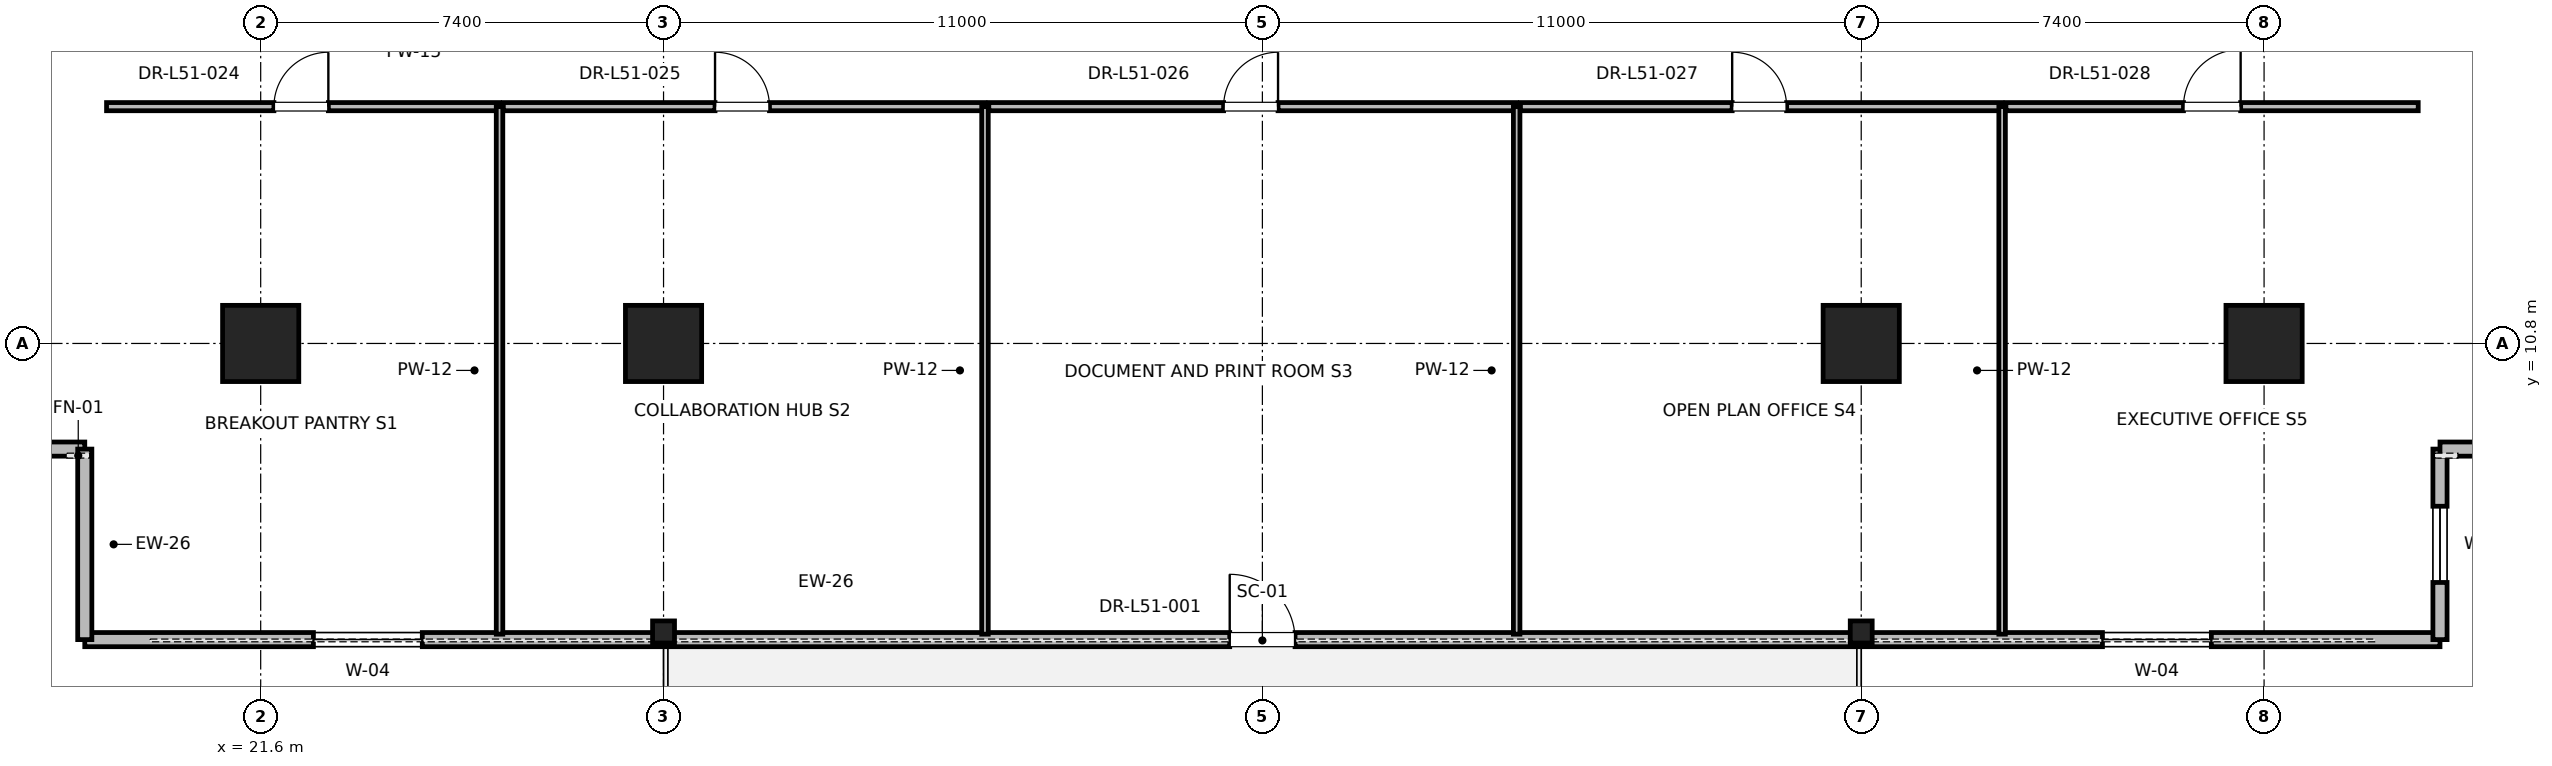
"""IFC4 building model, lengths in metres.
Left out: names, types, materials, properties, quantities, classifications, styles, units other than length and angle.
Written with IfcOpenShell. Run it as: python <this file> out.ifc"""

import sys

from ifc_helpers import new_model, si_unit, direction, frame, frame_2d, origin, origin_2d, place, context, subcontext, project, spatial, rectangle, i_section, extrude, element, fill, save


model = new_model("IFC4")
c1 = context("Model", 3, precision=1e-05, world=origin(), true_north=direction((0.0, 1.0)))
c2 = subcontext(c1, "Body", "Model", "MODEL_VIEW")
j1 = project(units=[si_unit("LENGTHUNIT", "METRE"), si_unit("PLANEANGLEUNIT", "RADIAN")], contexts=[c1])
p1 = place(None, origin())
s1 = spatial("IfcSite", under=j1, at=p1, CompositionType="ELEMENT")
p2 = place(p1, origin())
s2 = spatial("IfcBuilding", under=s1, at=p2, CompositionType="ELEMENT")
p3 = place(p2, frame((0.0, 0.0, 221.2)))
s3 = spatial("IfcBuildingStorey", under=s2, at=p3, CompositionType="ELEMENT", Elevation=221.2)
for number, where, z_axis, x_axis in (
    (1, (29.0, 10.8, 0.0), (0.0, 0.0, 1.0), (1.0, 0.0, 0.0)),
    (2, (51.0, 10.8, 0.0), (0.0, 0.0, 1.0), (1.0, 0.0, 0.0)),
    (3, (21.6, 10.8, 0.0), (0.0, 0.0, 1.0), (1.0, 0.0, 0.0)),
    (4, (58.4, 10.8, 0.0), (0.0, 0.0, 1.0), (1.0, 0.0, 0.0)),
):
    element("IfcColumn", number, at=place(p3, frame(where, z_axis=z_axis, x_axis=x_axis)), inside=s3, PredefinedType="COLUMN", context=c2, shape_type="SweptSolid", body=[
        extrude(rectangle(XDim=1.4, YDim=1.4, at=origin_2d()), origin(), (0.0, 0.0, 1.0), 4.0),
    ])
for number, where, z_axis, x_axis in (
    (5, (29.0, 5.5, 0.0), (0.0, 0.0, 1.0), (1.0, 0.0, 0.0)),
    (6, (51.0, 5.5, 0.0), (0.0, 0.0, 1.0), (1.0, 0.0, 0.0)),
):
    element("IfcColumn", number, at=place(p3, frame(where, z_axis=z_axis, x_axis=x_axis)), inside=s3, PredefinedType="COLUMN", context=c2, shape_type="SweptSolid", body=[
        extrude(i_section(OverallWidth=0.403, OverallDepth=0.406, WebThickness=0.027, FlangeThickness=0.043, FilletRadius=0.015, at=origin_2d()), origin(), (0.0, 0.0, 1.0), 4.0),
    ])
p4 = place(p3, frame((18.369, 5.36, 0.0), z_axis=(0.0, 0.0, 1.0), x_axis=(1.0, 0.0, 0.0)))
e7 = element("IfcWall", 7, at=p4, inside=s3, PredefinedType="PARAPET", context=c2, shape_type="SweptSolid", body=[
    extrude(rectangle(XDim=43.263, YDim=0.26, at=frame_2d((21.631, 0.0))), origin(), (0.0, 0.0, 1.0), 3.047),
])
p5 = place(p4, frame((4.2, 0.0, 0.85)))
e8 = element("IfcOpeningElement", 8, at=p5, cuts=e7, PredefinedType="OPENING", context=c2, shape_type="SweptSolid", body=[
    extrude(rectangle(XDim=2.0, YDim=2.3, at=frame_2d((1.0, 1.15))), frame((0.0, 0.13, 0.0), z_axis=(0.0, -1.0, 0.0), x_axis=(1.0, 0.0, 0.0)), (0.0, 0.0, 1.0), 0.26),
])
p6 = place(p4, frame((21.031, 0.0, 0.0)))
e9 = element("IfcOpeningElement", 9, at=p6, cuts=e7, PredefinedType="OPENING", context=c2, shape_type="SweptSolid", body=[
    extrude(rectangle(XDim=1.2, YDim=2.2, at=frame_2d((0.6, 1.1))), frame((0.0, 0.13, 0.0), z_axis=(0.0, -1.0, 0.0), x_axis=(1.0, 0.0, 0.0)), (0.0, 0.0, 1.0), 0.26),
])
p7 = place(p4, frame((37.062, 0.0, 0.85)))
e10 = element("IfcOpeningElement", 10, at=p7, cuts=e7, PredefinedType="OPENING", context=c2, shape_type="SweptSolid", body=[
    extrude(rectangle(XDim=2.0, YDim=2.3, at=frame_2d((1.0, 1.15))), frame((0.0, 0.13, 0.0), z_axis=(0.0, -1.0, 0.0), x_axis=(1.0, 0.0, 0.0)), (0.0, 0.0, 1.0), 0.26),
])
p8 = place(p3, frame((14.369, 8.86, 0.0), z_axis=(0.0, 0.0, 1.0), x_axis=(1.0, 0.0, 0.0)))
e11 = element("IfcWall", 11, at=p8, inside=s3, PredefinedType="PARAPET", context=c2, shape_type="SweptSolid", body=[
    extrude(rectangle(XDim=4.0, YDim=0.26, at=frame_2d((2.0, 0.0))), origin(), (0.0, 0.0, 1.0), 3.775),
])
p9 = place(p8, frame((1.3, 0.0, 0.85)))
e12 = element("IfcOpeningElement", 12, at=p9, cuts=e11, PredefinedType="OPENING", context=c2, shape_type="SweptSolid", body=[
    extrude(rectangle(XDim=1.4, YDim=2.0, at=frame_2d((0.7, 1.0))), frame((0.0, 0.13, 0.0), z_axis=(0.0, -1.0, 0.0), x_axis=(1.0, 0.0, 0.0)), (0.0, 0.0, 1.0), 0.26),
])
p10 = place(p3, frame((18.369, 8.86, 0.0), z_axis=(0.0, 0.0, 1.0), x_axis=(0.0, -1.0, 0.0)))
e13 = element("IfcWall", 13, at=p10, inside=s3, PredefinedType="PARAPET", context=c2, shape_type="SweptSolid", body=[
    extrude(rectangle(XDim=3.5, YDim=0.26, at=frame_2d((1.75, 0.0))), origin(), (0.0, 0.0, 1.0), 3.775),
])
p11 = place(p3, frame((61.631, 5.36, 0.0), z_axis=(0.0, 0.0, 1.0), x_axis=(0.0, 1.0, 0.0)))
e14 = element("IfcWall", 14, at=p11, inside=s3, PredefinedType="PARAPET", context=c2, shape_type="SweptSolid", body=[
    extrude(rectangle(XDim=3.5, YDim=0.26, at=frame_2d((1.75, 0.0))), origin(), (0.0, 0.0, 1.0), 3.775),
])
p12 = place(p11, frame((1.05, 0.0, 0.85)))
e15 = element("IfcOpeningElement", 15, at=p12, cuts=e14, PredefinedType="OPENING", context=c2, shape_type="SweptSolid", body=[
    extrude(rectangle(XDim=1.4, YDim=2.0, at=frame_2d((0.7, 1.0))), frame((0.0, 0.13, 0.0), z_axis=(0.0, -1.0, 0.0), x_axis=(1.0, 0.0, 0.0)), (0.0, 0.0, 1.0), 0.26),
])
p13 = place(p3, frame((61.631, 8.86, 0.0), z_axis=(0.0, 0.0, 1.0), x_axis=(1.0, 0.0, 0.0)))
e16 = element("IfcWall", 16, at=p13, inside=s3, PredefinedType="PARAPET", context=c2, shape_type="SweptSolid", body=[
    extrude(rectangle(XDim=4.0, YDim=0.26, at=frame_2d((2.0, 0.0))), origin(), (0.0, 0.0, 1.0), 3.775),
])
p14 = place(p3, frame((18.769, 15.15, 0.0), z_axis=(0.0, 0.0, 1.0), x_axis=(1.0, 0.0, 0.0)))
e17 = element("IfcWall", 17, at=p14, inside=s3, PredefinedType="PARTITIONING", context=c2, shape_type="SweptSolid", body=[
    extrude(rectangle(XDim=7.219, YDim=0.15, at=frame_2d((3.609, 0.0))), origin(), (0.0, 0.0, 1.0), 2.85),
])
p15 = place(p14, frame((3.074, 0.0, 0.0)))
e18 = element("IfcOpeningElement", 18, at=p15, cuts=e17, PredefinedType="OPENING", context=c2, shape_type="SweptSolid", body=[
    extrude(rectangle(XDim=1.0, YDim=2.15, at=frame_2d((0.5, 1.075))), frame((0.0, 0.075, 0.0), z_axis=(0.0, -1.0, 0.0), x_axis=(1.0, 0.0, 0.0)), (0.0, 0.0, 1.0), 0.15),
])
p16 = place(p3, frame((25.987, 5.46, 0.0), z_axis=(0.0, 0.0, 1.0), x_axis=(0.0, 1.0, 0.0)))
e19 = element("IfcWall", 19, at=p16, inside=s3, PredefinedType="PARTITIONING", context=c2, shape_type="SweptSolid", body=[
    extrude(rectangle(XDim=9.69, YDim=0.12, at=frame_2d((4.845, 0.0))), origin(), (0.0, 0.0, 1.0), 2.85),
])
p17 = place(p3, frame((26.057, 15.15, 0.0), z_axis=(0.0, 0.0, 1.0), x_axis=(1.0, 0.0, 0.0)))
e20 = element("IfcWall", 20, at=p17, inside=s3, PredefinedType="PARTITIONING", context=c2, shape_type="SweptSolid", body=[
    extrude(rectangle(XDim=8.847, YDim=0.15, at=frame_2d((4.424, 0.0))), origin(), (0.0, 0.0, 1.0), 2.85),
])
p18 = place(p17, frame((3.889, 0.0, 0.0)))
e21 = element("IfcOpeningElement", 21, at=p18, cuts=e20, PredefinedType="OPENING", context=c2, shape_type="SweptSolid", body=[
    extrude(rectangle(XDim=1.0, YDim=2.15, at=frame_2d((0.5, 1.075))), frame((0.0, 0.075, 0.0), z_axis=(0.0, -1.0, 0.0), x_axis=(1.0, 0.0, 0.0)), (0.0, 0.0, 1.0), 0.15),
])
p19 = place(p3, frame((34.905, 5.46, 0.0), z_axis=(0.0, 0.0, 1.0), x_axis=(0.0, 1.0, 0.0)))
e22 = element("IfcWall", 22, at=p19, inside=s3, PredefinedType="PARTITIONING", context=c2, shape_type="SweptSolid", body=[
    extrude(rectangle(XDim=9.69, YDim=0.12, at=frame_2d((4.845, 0.0))), origin(), (0.0, 0.0, 1.0), 2.405),
])
p20 = place(p3, frame((34.975, 15.15, 0.0), z_axis=(0.0, 0.0, 1.0), x_axis=(1.0, 0.0, 0.0)))
e23 = element("IfcWall", 23, at=p20, inside=s3, PredefinedType="PARTITIONING", context=c2, shape_type="SweptSolid", body=[
    extrude(rectangle(XDim=9.696, YDim=0.15, at=frame_2d((4.848, 0.0))), origin(), (0.0, 0.0, 1.0), 2.85),
])
p21 = place(p20, frame((4.313, 0.0, 0.0)))
e24 = element("IfcOpeningElement", 24, at=p21, cuts=e23, PredefinedType="OPENING", context=c2, shape_type="SweptSolid", body=[
    extrude(rectangle(XDim=1.0, YDim=2.15, at=frame_2d((0.5, 1.075))), frame((0.0, 0.075, 0.0), z_axis=(0.0, -1.0, 0.0), x_axis=(1.0, 0.0, 0.0)), (0.0, 0.0, 1.0), 0.15),
])
p22 = place(p3, frame((44.671, 5.46, 0.0), z_axis=(0.0, 0.0, 1.0), x_axis=(0.0, 1.0, 0.0)))
e25 = element("IfcWall", 25, at=p22, inside=s3, PredefinedType="PARTITIONING", context=c2, shape_type="SweptSolid", body=[
    extrude(rectangle(XDim=9.69, YDim=0.12, at=frame_2d((4.845, 0.0))), origin(), (0.0, 0.0, 1.0), 2.405),
])
p23 = place(p3, frame((44.741, 15.15, 0.0), z_axis=(0.0, 0.0, 1.0), x_axis=(1.0, 0.0, 0.0)))
e26 = element("IfcWall", 26, at=p23, inside=s3, PredefinedType="PARTITIONING", context=c2, shape_type="SweptSolid", body=[
    extrude(rectangle(XDim=8.847, YDim=0.15, at=frame_2d((4.423, 0.0))), origin(), (0.0, 0.0, 1.0), 2.85),
])
p24 = place(p23, frame((3.889, 0.0, 0.0)))
e27 = element("IfcOpeningElement", 27, at=p24, cuts=e26, PredefinedType="OPENING", context=c2, shape_type="SweptSolid", body=[
    extrude(rectangle(XDim=1.0, YDim=2.15, at=frame_2d((0.5, 1.075))), frame((0.0, 0.075, 0.0), z_axis=(0.0, -1.0, 0.0), x_axis=(1.0, 0.0, 0.0)), (0.0, 0.0, 1.0), 0.15),
])
p25 = place(p3, frame((53.588, 5.46, 0.0), z_axis=(0.0, 0.0, 1.0), x_axis=(0.0, 1.0, 0.0)))
e28 = element("IfcWall", 28, at=p25, inside=s3, PredefinedType="PARTITIONING", context=c2, shape_type="SweptSolid", body=[
    extrude(rectangle(XDim=9.69, YDim=0.12, at=frame_2d((4.845, 0.0))), origin(), (0.0, 0.0, 1.0), 2.85),
])
p26 = place(p3, frame((53.658, 15.15, 0.0), z_axis=(0.0, 0.0, 1.0), x_axis=(1.0, 0.0, 0.0)))
e29 = element("IfcWall", 29, at=p26, inside=s3, PredefinedType="PARTITIONING", context=c2, shape_type="SweptSolid", body=[
    extrude(rectangle(XDim=7.573, YDim=0.15, at=frame_2d((3.787, 0.0))), origin(), (0.0, 0.0, 1.0), 2.85),
])
p27 = place(p26, frame((3.262, 0.0, 0.0)))
e30 = element("IfcOpeningElement", 30, at=p27, cuts=e29, PredefinedType="OPENING", context=c2, shape_type="SweptSolid", body=[
    extrude(rectangle(XDim=1.05, YDim=2.2, at=frame_2d((0.525, 1.1))), frame((0.0, 0.075, 0.0), z_axis=(0.0, -1.0, 0.0), x_axis=(1.0, 0.0, 0.0)), (0.0, 0.0, 1.0), 0.15),
])
p28 = place(p5, origin())
e31 = element("IfcWindow", 31, at=p28, inside=s3, PartitioningType="SINGLE_PANEL", PredefinedType="WINDOW", context=c2, shape_type="SweptSolid", body=[
    extrude(rectangle(XDim=2.0, YDim=2.3, at=frame_2d((1.0, 1.15))), frame((0.0, 0.03, 0.0), z_axis=(0.0, -1.0, 0.0), x_axis=(1.0, 0.0, 0.0)), (0.0, 0.0, 1.0), 0.06),
])
fill(e8, e31)
p29 = place(p6, origin())
e32 = element("IfcDoor", 32, at=p29, inside=s3, OperationType="SINGLE_SWING_LEFT", PredefinedType="DOOR", context=c2, shape_type="SweptSolid", body=[
    extrude(rectangle(XDim=1.2, YDim=2.2, at=frame_2d((0.6, 1.1))), frame((0.0, 0.025, 0.0), z_axis=(0.0, -1.0, 0.0), x_axis=(1.0, 0.0, 0.0)), (0.0, 0.0, 1.0), 0.05),
])
fill(e9, e32)
p30 = place(p7, origin())
e33 = element("IfcWindow", 33, at=p30, inside=s3, PartitioningType="SINGLE_PANEL", PredefinedType="WINDOW", context=c2, shape_type="SweptSolid", body=[
    extrude(rectangle(XDim=2.0, YDim=2.3, at=frame_2d((1.0, 1.15))), frame((0.0, 0.03, 0.0), z_axis=(0.0, -1.0, 0.0), x_axis=(1.0, 0.0, 0.0)), (0.0, 0.0, 1.0), 0.06),
])
fill(e10, e33)
p31 = place(p12, origin())
e34 = element("IfcWindow", 34, at=p31, inside=s3, PartitioningType="SINGLE_PANEL", PredefinedType="WINDOW", context=c2, shape_type="SweptSolid", body=[
    extrude(rectangle(XDim=1.4, YDim=2.0, at=frame_2d((0.7, 1.0))), frame((0.0, 0.03, 0.0), z_axis=(0.0, -1.0, 0.0), x_axis=(1.0, 0.0, 0.0)), (0.0, 0.0, 1.0), 0.06),
])
fill(e15, e34)
p32 = place(p15, origin())
e35 = element("IfcDoor", 35, at=p32, inside=s3, OperationType="SINGLE_SWING_RIGHT", PredefinedType="DOOR", context=c2, shape_type="SweptSolid", body=[
    extrude(rectangle(XDim=1.0, YDim=2.15, at=frame_2d((0.5, 1.075))), frame((0.0, 0.025, 0.0), z_axis=(0.0, -1.0, 0.0), x_axis=(1.0, 0.0, 0.0)), (0.0, 0.0, 1.0), 0.05),
])
fill(e18, e35)
p33 = place(p18, origin())
e36 = element("IfcDoor", 36, at=p33, inside=s3, OperationType="SINGLE_SWING_LEFT", PredefinedType="DOOR", context=c2, shape_type="SweptSolid", body=[
    extrude(rectangle(XDim=1.0, YDim=2.15, at=frame_2d((0.5, 1.075))), frame((0.0, 0.025, 0.0), z_axis=(0.0, -1.0, 0.0), x_axis=(1.0, 0.0, 0.0)), (0.0, 0.0, 1.0), 0.05),
])
fill(e21, e36)
p34 = place(p21, origin())
e37 = element("IfcDoor", 37, at=p34, inside=s3, OperationType="SINGLE_SWING_RIGHT", PredefinedType="DOOR", context=c2, shape_type="SweptSolid", body=[
    extrude(rectangle(XDim=1.0, YDim=2.15, at=frame_2d((0.5, 1.075))), frame((0.0, 0.025, 0.0), z_axis=(0.0, -1.0, 0.0), x_axis=(1.0, 0.0, 0.0)), (0.0, 0.0, 1.0), 0.05),
])
fill(e24, e37)
p35 = place(p24, origin())
e38 = element("IfcDoor", 38, at=p35, inside=s3, OperationType="SINGLE_SWING_LEFT", PredefinedType="DOOR", context=c2, shape_type="SweptSolid", body=[
    extrude(rectangle(XDim=1.0, YDim=2.15, at=frame_2d((0.5, 1.075))), frame((0.0, 0.025, 0.0), z_axis=(0.0, -1.0, 0.0), x_axis=(1.0, 0.0, 0.0)), (0.0, 0.0, 1.0), 0.05),
])
fill(e27, e38)
p36 = place(p27, origin())
e39 = element("IfcDoor", 39, at=p36, inside=s3, OperationType="SINGLE_SWING_RIGHT", PredefinedType="DOOR", context=c2, shape_type="SweptSolid", body=[
    extrude(rectangle(XDim=1.05, YDim=2.2, at=frame_2d((0.525, 1.1))), frame((0.0, 0.025, 0.0), z_axis=(0.0, -1.0, 0.0), x_axis=(1.0, 0.0, 0.0)), (0.0, 0.0, 1.0), 0.05),
])
fill(e30, e39)
save(model, sys.argv[1])
